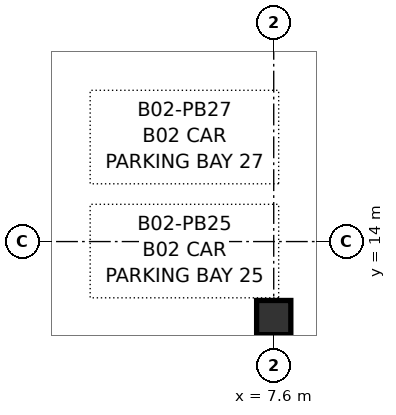
"""IFC4 building model, lengths in metres.
Left out: names, types, materials, properties, quantities, classifications, styles, units other than length and angle.
Written with IfcOpenShell. Run it as: python <this file> out.ifc"""

import sys

from ifc_helpers import new_model, si_unit, direction, frame, origin, origin_2d, place, context, subcontext, project, spatial, rectangle, extrude, source, transform, mapped, element, save


model = new_model("IFC4")
c1 = context("Model", 3, precision=1e-05, world=origin(), true_north=direction((0.0, 1.0)))
c2 = subcontext(c1, "Body", "Model", "MODEL_VIEW")
j1 = project(units=[si_unit("LENGTHUNIT", "METRE"), si_unit("PLANEANGLEUNIT", "RADIAN")], contexts=[c1])
p1 = place(None, origin())
s1 = spatial("IfcSite", under=j1, at=p1, CompositionType="ELEMENT")
p2 = place(p1, origin())
s2 = spatial("IfcBuilding", under=s1, at=p2, CompositionType="ELEMENT")
p3 = place(p2, frame((0.0, 0.0, -8.7)))
s3 = spatial("IfcBuildingStorey", under=s2, at=p3, CompositionType="ELEMENT", Elevation=-8.7)
m1 = source(origin(), c2, "Body", "SweptSolid", [
    extrude(rectangle(XDim=0.9, YDim=0.9, at=origin_2d()), origin(), (0.0, 0.0, 1.0), 4.2),
])
p4 = place(p3, frame((7.6, 12.0, 0.0), z_axis=(0.0, 0.0, 1.0), x_axis=(1.0, 0.0, 0.0)))
e1 = element("IfcColumn", 1, at=p4, inside=s3, PredefinedType="COLUMN", context=c2, shape_type="MappedRepresentation", body=[
    mapped(m1, transform((0.0, 0.0, 0.0), x_axis=(1.0, 0.0, 0.0), y_axis=(0.0, 1.0, 0.0), z_axis=(0.0, 0.0, 1.0), scale=1.0)),
])
save(model, sys.argv[1])
